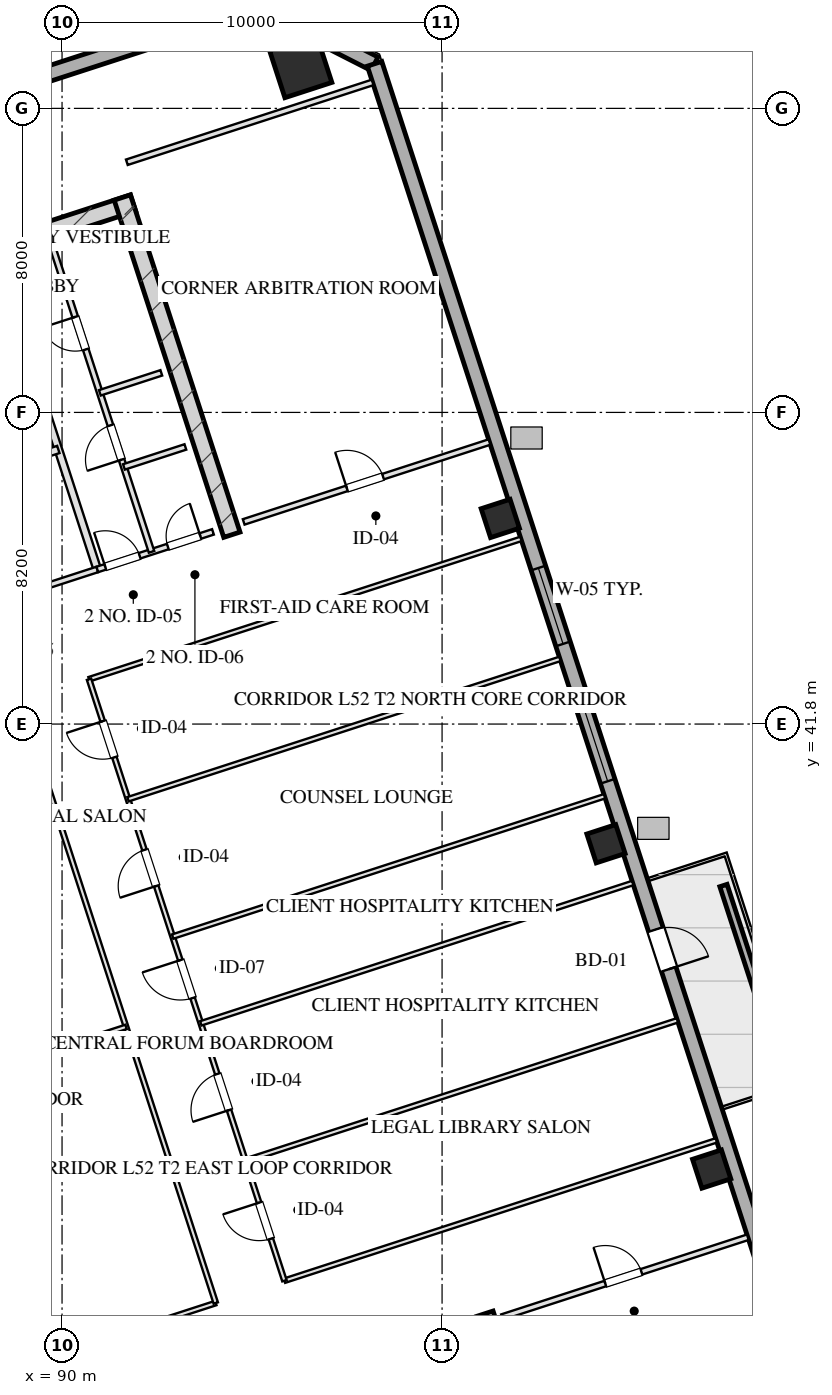
"""IFC4 building model, lengths in metres.
Left out: names, types, materials, properties, quantities, classifications, styles, units other than length and angle.
Written with IfcOpenShell. Run it as: python <this file> out.ifc"""

import sys

from ifc_helpers import new_model, si_unit, direction, frame, frame_2d, origin, origin_2d, place, context, subcontext, project, spatial, rectangle, hollow_rectangle, extrude, element, fill, save


model = new_model("IFC4")
c1 = context("Model", 3, precision=1e-05, world=origin(), true_north=direction((0.0, 1.0)))
c2 = subcontext(c1, "Body", "Model", "MODEL_VIEW")
j1 = project(units=[si_unit("LENGTHUNIT", "METRE"), si_unit("PLANEANGLEUNIT", "RADIAN")], contexts=[c1])
p1 = place(None, origin())
s1 = spatial("IfcSite", under=j1, at=p1, CompositionType="ELEMENT")
p2 = place(p1, origin())
s2 = spatial("IfcBuilding", under=s1, at=p2, CompositionType="ELEMENT")
p3 = place(p2, frame((0.0, 0.0, 195.5)))
s3 = spatial("IfcBuildingStorey", under=s2, at=p3, CompositionType="ELEMENT", Elevation=195.5)
p4 = place(p3, frame((101.128, 26.286, 0.0), z_axis=(0.0, 0.0, 1.0), x_axis=(0.309004419953, -0.951060601881, 0.0)))
e1 = element("IfcWall", 1, at=p4, inside=s3, PredefinedType="SHEAR", context=c2, shape_type="SweptSolid", body=[
    extrude(rectangle(XDim=9.33, YDim=0.45, at=frame_2d((4.665, 0.0))), origin(), (0.0, 0.0, 1.0), 3.45),
])
p5 = place(p3, frame((76.415, 50.489, 0.0), z_axis=(0.0, 0.0, 1.0), x_axis=(0.951056810414, 0.309016089169, 0.0)))
e2 = element("IfcWall", 2, at=p5, inside=s3, PredefinedType="SHEAR", context=c2, shape_type="SweptSolid", body=[
    extrude(rectangle(XDim=16.25, YDim=0.45, at=frame_2d((8.125, 0.0))), origin(), (0.0, 0.0, 1.0), 3.45),
])
p6 = place(p3, frame((94.469, 46.781, 0.0), z_axis=(0.0, 0.0, 1.0), x_axis=(-0.309004419953, 0.951060601881, 0.0)))
e3 = element("IfcWall", 3, at=p6, inside=s3, PredefinedType="SHEAR", context=c2, shape_type="SweptSolid", body=[
    extrude(rectangle(XDim=9.33, YDim=0.45, at=frame_2d((4.665, 0.0))), origin(), (0.0, 0.0, 1.0), 3.45),
])
p7 = place(p3, frame((96.281, 59.099, 0.0), z_axis=(0.0, 0.0, 1.0), x_axis=(0.951056516295, 0.309016994375, 0.0)))
e4 = element("IfcColumn", 4, at=p7, inside=s3, PredefinedType="COLUMN", context=c2, shape_type="SweptSolid", body=[
    extrude(hollow_rectangle(XDim=1.3, YDim=1.3, WallThickness=0.045, at=origin_2d()), origin(), (0.0, 0.0, 1.0), 3.451),
])
for number, where, z_axis, x_axis in (
    (5, (107.094, 30.091, 0.0), (0.0, 0.0, 1.0), (0.951, 0.309, 0.0)),
    (6, (104.313, 38.651, 0.0), (0.0, 0.0, 1.0), (0.951, 0.309, 0.0)),
    (7, (101.532, 47.21, 0.0), (0.0, 0.0, 1.0), (0.951, 0.309, 0.0)),
):
    element("IfcColumn", number, at=place(p3, frame(where, z_axis=z_axis, x_axis=x_axis)), inside=s3, PredefinedType="COLUMN", context=c2, shape_type="SweptSolid", body=[
        extrude(hollow_rectangle(XDim=0.8, YDim=0.8, WallThickness=0.028, at=origin_2d()), origin(), (0.0, 0.0, 1.0), 3.451),
    ])
p8 = place(p3, frame((70.092, 52.556, 0.0), z_axis=(0.0, 0.0, 1.0), x_axis=(0.951057580055, 0.30901372044, 0.0)))
e8 = element("IfcWall", 8, at=p8, inside=s3, PredefinedType="SOLIDWALL", context=c2, shape_type="SweptSolid", body=[
    extrude(rectangle(XDim=26.4, YDim=0.4, at=frame_2d((13.2, 0.0))), origin(), (0.0, 0.0, 1.0), 2.61),
])
p9 = place(p3, frame((95.199, 60.714, 0.0), z_axis=(0.0, 0.0, 1.0), x_axis=(0.891020832027, -0.453962417932, 0.0)))
e9 = element("IfcWall", 9, at=p9, inside=s3, PredefinedType="SOLIDWALL", context=c2, shape_type="SweptSolid", body=[
    extrude(rectangle(XDim=3.394, YDim=0.4, at=frame_2d((1.697, 0.0))), origin(), (0.0, 0.0, 1.0), 2.61),
])
p10 = place(p3, frame((98.224, 59.173, 0.0), z_axis=(0.0, 0.0, 1.0), x_axis=(0.309014228706, -0.951057414911, 0.0)))
e10 = element("IfcWall", 10, at=p10, inside=s3, PredefinedType="SOLIDWALL", context=c2, shape_type="SweptSolid", body=[
    extrude(rectangle(XDim=42.8, YDim=0.4, at=frame_2d((21.4, 0.0))), origin(), (0.0, 0.0, 1.0), 2.61),
])
p11 = place(p10, frame((17.75, 0.0, 0.75)))
e11 = element("IfcOpeningElement", 11, at=p11, cuts=e10, PredefinedType="OPENING", context=c2, shape_type="SweptSolid", body=[
    extrude(rectangle(XDim=2.1, YDim=1.46, at=frame_2d((1.05, 0.73))), frame((0.0, 0.21, 0.0), z_axis=(0.0, -1.0, 0.0), x_axis=(1.0, 0.0, 0.0)), (0.0, 0.0, 1.0), 0.42),
])
p12 = place(p10, frame((13.95, 0.0, 0.75)))
e12 = element("IfcOpeningElement", 12, at=p12, cuts=e10, PredefinedType="OPENING", context=c2, shape_type="SweptSolid", body=[
    extrude(rectangle(XDim=2.1, YDim=1.46, at=frame_2d((1.05, 0.73))), frame((0.0, 0.21, 0.0), z_axis=(0.0, -1.0, 0.0), x_axis=(1.0, 0.0, 0.0)), (0.0, 0.0, 1.0), 0.42),
])
p13 = place(p10, frame((23.95, 0.0, 0.0)))
e13 = element("IfcOpeningElement", 13, at=p13, cuts=e10, PredefinedType="OPENING", context=c2, shape_type="SweptSolid", body=[
    extrude(rectangle(XDim=1.1, YDim=2.15, at=frame_2d((0.55, 1.075))), frame((0.0, 0.21, 0.0), z_axis=(0.0, -1.0, 0.0), x_axis=(1.0, 0.0, 0.0)), (0.0, 0.0, 1.0), 0.42),
])
p14 = place(p3, frame((108.887, 32.987, 0.0), z_axis=(0.0, 0.0, 1.0), x_axis=(-0.30900096172, 0.951061725471, 0.0)))
e14 = element("IfcWall", 14, at=p14, inside=s3, PredefinedType="PARAPET", context=c2, shape_type="SweptSolid", body=[
    extrude(rectangle(XDim=4.8, YDim=0.2, at=frame_2d((2.4, 0.0))), origin(), (0.0, 0.0, 1.0), 0.75),
])
p15 = place(p3, frame((90.928, 45.868, 0.0), z_axis=(0.0, 0.0, 1.0), x_axis=(-0.309042196757, 0.951048327176, 0.0)))
e15 = element("IfcWall", 15, at=p15, inside=s3, PredefinedType="PARTITIONING", context=c2, shape_type="SweptSolid", body=[
    extrude(rectangle(XDim=8.43, YDim=0.2, at=frame_2d((4.215, 0.0))), origin(), (0.0, 0.0, 1.0), 3.175),
])
p16 = place(p3, frame((86.743, 44.508, 0.0), z_axis=(0.0, 0.0, 1.0), x_axis=(0.951063829732, 0.308994485023, 0.0)))
e16 = element("IfcWall", 16, at=p16, inside=s3, PredefinedType="PARTITIONING", context=c2, shape_type="SweptSolid", body=[
    extrude(rectangle(XDim=4.4, YDim=0.15, at=frame_2d((2.2, 0.0))), origin(), (0.0, 0.0, 1.0), 3.175),
])
p17 = place(p16, frame((1.45, 0.0, 0.0)))
e17 = element("IfcOpeningElement", 17, at=p17, cuts=e16, PredefinedType="OPENING", context=c2, shape_type="SweptSolid", body=[
    extrude(rectangle(XDim=1.5, YDim=2.05, at=frame_2d((0.75, 1.025))), frame((0.0, 0.085, 0.0), z_axis=(0.0, -1.0, 0.0), x_axis=(1.0, 0.0, 0.0)), (0.0, 0.0, 1.0), 0.17),
])
p18 = place(p3, frame((85.718, 47.666, 0.0), z_axis=(0.0, 0.0, 1.0), x_axis=(0.951058531764, 0.30901079133, 0.0)))
e18 = element("IfcWall", 18, at=p18, inside=s3, PredefinedType="PARTITIONING", context=c2, shape_type="SweptSolid", body=[
    extrude(rectangle(XDim=4.4, YDim=0.2, at=frame_2d((2.2, 0.0))), origin(), (0.0, 0.0, 1.0), 3.175),
])
p19 = place(p18, frame((0.45, 0.0, 0.0)))
e19 = element("IfcOpeningElement", 19, at=p19, cuts=e18, PredefinedType="OPENING", context=c2, shape_type="SweptSolid", body=[
    extrude(rectangle(XDim=1.1, YDim=2.05, at=frame_2d((0.55, 1.025))), frame((0.0, 0.11, 0.0), z_axis=(0.0, -1.0, 0.0), x_axis=(1.0, 0.0, 0.0)), (0.0, 0.0, 1.0), 0.22),
])
p20 = place(p18, frame((2.55, 0.0, 0.0)))
e20 = element("IfcOpeningElement", 20, at=p20, cuts=e18, PredefinedType="OPENING", context=c2, shape_type="SweptSolid", body=[
    extrude(rectangle(XDim=1.1, YDim=2.05, at=frame_2d((0.55, 1.025))), frame((0.0, 0.11, 0.0), z_axis=(0.0, -1.0, 0.0), x_axis=(1.0, 0.0, 0.0)), (0.0, 0.0, 1.0), 0.22),
])
p21 = place(p3, frame((90.928, 45.868, 0.0), z_axis=(0.0, 0.0, 1.0), x_axis=(0.951059297078, 0.309008435874, 0.0)))
e21 = element("IfcWall", 21, at=p21, inside=s3, PredefinedType="PARTITIONING", context=c2, shape_type="SweptSolid", body=[
    extrude(rectangle(XDim=3.2, YDim=0.15, at=frame_2d((1.6, 0.0))), origin(), (0.0, 0.0, 1.0), 3.175),
])
p22 = place(p21, frame((0.22, 0.0, 0.0)))
e22 = element("IfcOpeningElement", 22, at=p22, cuts=e21, PredefinedType="OPENING", context=c2, shape_type="SweptSolid", body=[
    extrude(rectangle(XDim=0.95, YDim=2.05, at=frame_2d((0.475, 1.025))), frame((0.0, 0.085, 0.0), z_axis=(0.0, -1.0, 0.0), x_axis=(1.0, 0.0, 0.0)), (0.0, 0.0, 1.0), 0.17),
])
p23 = place(p21, frame((1.95, 0.0, 0.0)))
e23 = element("IfcOpeningElement", 23, at=p23, cuts=e21, PredefinedType="OPENING", context=c2, shape_type="SweptSolid", body=[
    extrude(rectangle(XDim=0.9, YDim=2.05, at=frame_2d((0.45, 1.025))), frame((0.0, 0.085, 0.0), z_axis=(0.0, -1.0, 0.0), x_axis=(1.0, 0.0, 0.0)), (0.0, 0.0, 1.0), 0.17),
])
p24 = place(p3, frame((92.355, 46.331, 0.0), z_axis=(0.0, 0.0, 1.0), x_axis=(-0.309007490203, 0.951059604335, 0.0)))
e24 = element("IfcWall", 24, at=p24, inside=s3, PredefinedType="PARTITIONING", context=c2, shape_type="SweptSolid", body=[
    extrude(rectangle(XDim=8.43, YDim=0.15, at=frame_2d((4.215, 0.0))), origin(), (0.0, 0.0, 1.0), 3.175),
])
p25 = place(p24, frame((2.55, 0.0, 0.0)))
e25 = element("IfcOpeningElement", 25, at=p25, cuts=e24, PredefinedType="OPENING", context=c2, shape_type="SweptSolid", body=[
    extrude(rectangle(XDim=0.95, YDim=2.05, at=frame_2d((0.475, 1.025))), frame((0.0, 0.085, 0.0), z_axis=(0.0, -1.0, 0.0), x_axis=(1.0, 0.0, 0.0)), (0.0, 0.0, 1.0), 0.17),
])
p26 = place(p24, frame((5.6, 0.0, 0.0)))
e26 = element("IfcOpeningElement", 26, at=p26, cuts=e24, PredefinedType="OPENING", context=c2, shape_type="SweptSolid", body=[
    extrude(rectangle(XDim=0.9, YDim=2.05, at=frame_2d((0.45, 1.025))), frame((0.0, 0.085, 0.0), z_axis=(0.0, -1.0, 0.0), x_axis=(1.0, 0.0, 0.0)), (0.0, 0.0, 1.0), 0.17),
])
p27 = place(p3, frame((90.995, 50.516, 0.0), z_axis=(0.0, 0.0, 1.0), x_axis=(0.951040401051, 0.309066587596, 0.0)))
e27 = element("IfcWall", 27, at=p27, inside=s3, PredefinedType="PARTITIONING", context=c2, shape_type="SweptSolid", body=[
    extrude(rectangle(XDim=1.7, YDim=0.15, at=frame_2d((0.85, 0.0))), origin(), (0.0, 0.0, 1.0), 3.175),
])
p28 = place(p3, frame((91.628, 48.566, 0.0), z_axis=(0.0, 0.0, 1.0), x_axis=(0.951054116971, 0.309024378638, 0.0)))
e28 = element("IfcWall", 28, at=p28, inside=s3, PredefinedType="PARTITIONING", context=c2, shape_type="SweptSolid", body=[
    extrude(rectangle(XDim=1.7, YDim=0.15, at=frame_2d((0.85, 0.0))), origin(), (0.0, 0.0, 1.0), 3.175),
])
p29 = place(p3, frame((101.578, 26.196, 0.0), z_axis=(0.0, 0.0, 1.0), x_axis=(0.951064934653, 0.308991084134, 0.0)))
e29 = element("IfcWall", 29, at=p29, inside=s3, PredefinedType="PARTITIONING", context=c2, shape_type="SweptSolid", body=[
    extrude(rectangle(XDim=6.8, YDim=0.15, at=frame_2d((3.4, 0.0))), origin(), (0.0, 0.0, 1.0), 3.175),
])
p30 = place(p29, frame((2.856, 0.0, 0.0)))
e30 = element("IfcOpeningElement", 30, at=p30, cuts=e29, PredefinedType="OPENING", context=c2, shape_type="SweptSolid", body=[
    extrude(rectangle(XDim=1.0, YDim=2.05, at=frame_2d((0.5, 1.025))), frame((0.0, 0.085, 0.0), z_axis=(0.0, -1.0, 0.0), x_axis=(1.0, 0.0, 0.0)), (0.0, 0.0, 1.0), 0.17),
])
p31 = place(p3, frame((91.705, 56.582, 0.0), z_axis=(0.0, 0.0, 1.0), x_axis=(0.951057811516, 0.309013008068, 0.0)))
e31 = element("IfcWall", 31, at=p31, inside=s3, PredefinedType="PARTITIONING", context=c2, shape_type="SweptSolid", body=[
    extrude(rectangle(XDim=6.8, YDim=0.15, at=frame_2d((3.4, 0.0))), origin(), (0.0, 0.0, 1.0), 3.175),
])
p32 = place(p3, frame((94.78, 47.119, 0.0), z_axis=(0.0, 0.0, 1.0), x_axis=(0.951057811516, 0.309013008068, 0.0)))
e32 = element("IfcWall", 32, at=p32, inside=s3, PredefinedType="PARTITIONING", context=c2, shape_type="SweptSolid", body=[
    extrude(rectangle(XDim=6.8, YDim=0.15, at=frame_2d((3.4, 0.0))), origin(), (0.0, 0.0, 1.0), 3.175),
])
p33 = place(p32, frame((2.856, 0.0, 0.0)))
e33 = element("IfcOpeningElement", 33, at=p33, cuts=e32, PredefinedType="OPENING", context=c2, shape_type="SweptSolid", body=[
    extrude(rectangle(XDim=1.0, YDim=2.05, at=frame_2d((0.5, 1.025))), frame((0.0, 0.085, 0.0), z_axis=(0.0, -1.0, 0.0), x_axis=(1.0, 0.0, 0.0)), (0.0, 0.0, 1.0), 0.17),
])
p34 = place(p3, frame((88.814, 24.867, 0.0), z_axis=(0.0, 0.0, 1.0), x_axis=(0.951061793147, 0.309000753423, 0.0)))
e34 = element("IfcWall", 34, at=p34, inside=s3, PredefinedType="PARTITIONING", context=c2, shape_type="SweptSolid", body=[
    extrude(rectangle(XDim=5.5, YDim=0.12, at=frame_2d((2.75, 0.0))), origin(), (0.0, 0.0, 1.0), 3.175),
])
p35 = place(p3, frame((95.852, 27.153, 0.0), z_axis=(0.0, 0.0, 1.0), x_axis=(0.951054485045, 0.30902324585, 0.0)))
e35 = element("IfcWall", 35, at=p35, inside=s3, PredefinedType="PARTITIONING", context=c2, shape_type="SweptSolid", body=[
    extrude(rectangle(XDim=11.95, YDim=0.12, at=frame_2d((5.975, 0.0))), origin(), (0.0, 0.0, 1.0), 3.175),
])
p36 = place(p3, frame((90.71, 42.979, 0.0), z_axis=(0.0, 0.0, 1.0), x_axis=(0.95105853842, 0.309010770845, 0.0)))
e36 = element("IfcWall", 36, at=p36, inside=s3, PredefinedType="PARTITIONING", context=c2, shape_type="SweptSolid", body=[
    extrude(rectangle(XDim=11.95, YDim=0.12, at=frame_2d((5.975, 0.0))), origin(), (0.0, 0.0, 1.0), 3.175),
])
p37 = place(p3, frame((94.045, 26.566, 0.0), z_axis=(0.0, 0.0, 1.0), x_axis=(-0.30901773025, 0.951056277195, 0.0)))
e37 = element("IfcWall", 37, at=p37, inside=s3, PredefinedType="PARTITIONING", context=c2, shape_type="SweptSolid", body=[
    extrude(rectangle(XDim=16.64, YDim=0.12, at=frame_2d((8.32, 0.0))), origin(), (0.0, 0.0, 1.0), 3.175),
])
p38 = place(p3, frame((95.852, 27.153, 0.0), z_axis=(0.0, 0.0, 1.0), x_axis=(-0.309004459387, 0.951060589068, 0.0)))
e38 = element("IfcWall", 38, at=p38, inside=s3, PredefinedType="PARTITIONING", context=c2, shape_type="SweptSolid", body=[
    extrude(rectangle(XDim=16.64, YDim=0.12, at=frame_2d((8.32, 0.0))), origin(), (0.0, 0.0, 1.0), 3.175),
])
p39 = place(p38, frame((1.16, 0.0, 0.0)))
e39 = element("IfcOpeningElement", 39, at=p39, cuts=e38, PredefinedType="OPENING", context=c2, shape_type="SweptSolid", body=[
    extrude(rectangle(XDim=1.0, YDim=2.05, at=frame_2d((0.5, 1.025))), frame((0.0, 0.07, 0.0), z_axis=(0.0, -1.0, 0.0), x_axis=(1.0, 0.0, 0.0)), (0.0, 0.0, 1.0), 0.14),
])
p40 = place(p38, frame((4.72, 0.0, 0.0)))
e40 = element("IfcOpeningElement", 40, at=p40, cuts=e38, PredefinedType="OPENING", context=c2, shape_type="SweptSolid", body=[
    extrude(rectangle(XDim=1.0, YDim=2.05, at=frame_2d((0.5, 1.025))), frame((0.0, 0.07, 0.0), z_axis=(0.0, -1.0, 0.0), x_axis=(1.0, 0.0, 0.0)), (0.0, 0.0, 1.0), 0.14),
])
p41 = place(p38, frame((7.82, 0.0, 0.0)))
e41 = element("IfcOpeningElement", 41, at=p41, cuts=e38, PredefinedType="OPENING", context=c2, shape_type="SweptSolid", body=[
    extrude(rectangle(XDim=1.05, YDim=2.05, at=frame_2d((0.525, 1.025))), frame((0.0, 0.07, 0.0), z_axis=(0.0, -1.0, 0.0), x_axis=(1.0, 0.0, 0.0)), (0.0, 0.0, 1.0), 0.14),
])
p42 = place(p38, frame((10.92, 0.0, 0.0)))
e42 = element("IfcOpeningElement", 42, at=p42, cuts=e38, PredefinedType="OPENING", context=c2, shape_type="SweptSolid", body=[
    extrude(rectangle(XDim=1.0, YDim=2.05, at=frame_2d((0.5, 1.025))), frame((0.0, 0.07, 0.0), z_axis=(0.0, -1.0, 0.0), x_axis=(1.0, 0.0, 0.0)), (0.0, 0.0, 1.0), 0.14),
])
p43 = place(p38, frame((14.48, 0.0, 0.0)))
e43 = element("IfcOpeningElement", 43, at=p43, cuts=e38, PredefinedType="OPENING", context=c2, shape_type="SweptSolid", body=[
    extrude(rectangle(XDim=1.0, YDim=2.05, at=frame_2d((0.5, 1.025))), frame((0.0, 0.07, 0.0), z_axis=(0.0, -1.0, 0.0), x_axis=(1.0, 0.0, 0.0)), (0.0, 0.0, 1.0), 0.14),
])
p44 = place(p3, frame((86.453, 32.133, 0.0), z_axis=(0.0, 0.0, 1.0), x_axis=(0.951052986339, 0.309027858251, 0.0)))
e44 = element("IfcWall", 44, at=p44, inside=s3, PredefinedType="PARTITIONING", context=c2, shape_type="SweptSolid", body=[
    extrude(rectangle(XDim=5.5, YDim=0.12, at=frame_2d((2.75, 0.0))), origin(), (0.0, 0.0, 1.0), 3.175),
])
for number, where, z_axis, x_axis in (
    (45, (94.826, 30.311, 0.0), (0.0, 0.0, 1.0), (0.951, 0.309, 0.0)),
    (46, (93.652, 33.925, 0.0), (0.0, 0.0, 1.0), (0.951, 0.309, 0.0)),
):
    element("IfcWall", number, at=place(p3, frame(where, z_axis=z_axis, x_axis=x_axis)), inside=s3, PredefinedType="PARTITIONING", context=c2, shape_type="SweptSolid", body=[
        extrude(rectangle(XDim=11.95, YDim=0.12, at=frame_2d((5.975, 0.0))), origin(), (0.0, 0.0, 1.0), 3.175),
    ])
for number, where, z_axis, x_axis in (
    (47, (92.91, 36.207, 0.0), (0.0, 0.0, 1.0), (0.951, 0.309, 0.0)),
    (48, (91.736, 39.821, 0.0), (0.0, 0.0, 1.0), (0.951, 0.309, 0.0)),
):
    element("IfcWall", number, at=place(p3, frame(where, z_axis=z_axis, x_axis=x_axis)), inside=s3, PredefinedType="PARTITIONING", context=c2, shape_type="SweptSolid", body=[
        extrude(rectangle(XDim=11.95, YDim=0.12, at=frame_2d((5.975, 0.0))), origin(), (0.0, 0.0, 1.0), 3.175),
    ])
p45 = place(p11, origin())
e49 = element("IfcWindow", 49, at=p45, inside=s3, PartitioningType="TRIPLE_PANEL_VERTICAL", PredefinedType="WINDOW", context=c2, shape_type="SweptSolid", body=[
    extrude(rectangle(XDim=2.1, YDim=1.46, at=frame_2d((1.05, 0.73))), frame((0.0, 0.03, 0.0), z_axis=(0.0, -1.0, 0.0), x_axis=(1.0, 0.0, 0.0)), (0.0, 0.0, 1.0), 0.06),
])
fill(e11, e49)
p46 = place(p12, origin())
e50 = element("IfcWindow", 50, at=p46, inside=s3, PartitioningType="TRIPLE_PANEL_VERTICAL", PredefinedType="WINDOW", context=c2, shape_type="SweptSolid", body=[
    extrude(rectangle(XDim=2.1, YDim=1.46, at=frame_2d((1.05, 0.73))), frame((0.0, 0.03, 0.0), z_axis=(0.0, -1.0, 0.0), x_axis=(1.0, 0.0, 0.0)), (0.0, 0.0, 1.0), 0.06),
])
fill(e12, e50)
p47 = place(p13, origin())
e51 = element("IfcDoor", 51, at=p47, inside=s3, OperationType="SINGLE_SWING_RIGHT", PredefinedType="DOOR", context=c2, shape_type="SweptSolid", body=[
    extrude(rectangle(XDim=1.1, YDim=2.15, at=frame_2d((0.55, 1.075))), frame((0.0, 0.025, 0.0), z_axis=(0.0, -1.0, 0.0), x_axis=(1.0, 0.0, 0.0)), (0.0, 0.0, 1.0), 0.05),
])
fill(e13, e51)
p48 = place(p22, origin())
e52 = element("IfcDoor", 52, at=p48, inside=s3, OperationType="SINGLE_SWING_LEFT", PredefinedType="DOOR", context=c2, shape_type="SweptSolid", body=[
    extrude(rectangle(XDim=0.95, YDim=2.05, at=frame_2d((0.475, 1.025))), frame((0.0, 0.025, 0.0), z_axis=(0.0, -1.0, 0.0), x_axis=(1.0, 0.0, 0.0)), (0.0, 0.0, 1.0), 0.05),
])
fill(e22, e52)
p49 = place(p23, origin())
e53 = element("IfcDoor", 53, at=p49, inside=s3, OperationType="SINGLE_SWING_RIGHT", PredefinedType="DOOR", context=c2, shape_type="SweptSolid", body=[
    extrude(rectangle(XDim=0.9, YDim=2.05, at=frame_2d((0.45, 1.025))), frame((0.0, 0.025, 0.0), z_axis=(0.0, -1.0, 0.0), x_axis=(1.0, 0.0, 0.0)), (0.0, 0.0, 1.0), 0.05),
])
fill(e23, e53)
p50 = place(p25, origin())
e54 = element("IfcDoor", 54, at=p50, inside=s3, OperationType="SINGLE_SWING_LEFT", PredefinedType="DOOR", context=c2, shape_type="SweptSolid", body=[
    extrude(rectangle(XDim=0.95, YDim=2.05, at=frame_2d((0.475, 1.025))), frame((0.0, 0.025, 0.0), z_axis=(0.0, -1.0, 0.0), x_axis=(1.0, 0.0, 0.0)), (0.0, 0.0, 1.0), 0.05),
])
fill(e25, e54)
p51 = place(p26, origin())
e55 = element("IfcDoor", 55, at=p51, inside=s3, OperationType="SINGLE_SWING_RIGHT", PredefinedType="DOOR", context=c2, shape_type="SweptSolid", body=[
    extrude(rectangle(XDim=0.9, YDim=2.05, at=frame_2d((0.45, 1.025))), frame((0.0, 0.025, 0.0), z_axis=(0.0, -1.0, 0.0), x_axis=(1.0, 0.0, 0.0)), (0.0, 0.0, 1.0), 0.05),
])
fill(e26, e55)
p52 = place(p30, origin())
e56 = element("IfcDoor", 56, at=p52, inside=s3, OperationType="SINGLE_SWING_LEFT", PredefinedType="DOOR", context=c2, shape_type="SweptSolid", body=[
    extrude(rectangle(XDim=1.0, YDim=2.05, at=frame_2d((0.5, 1.025))), frame((0.0, 0.025, 0.0), z_axis=(0.0, -1.0, 0.0), x_axis=(1.0, 0.0, 0.0)), (0.0, 0.0, 1.0), 0.05),
])
fill(e30, e56)
p53 = place(p33, origin())
e57 = element("IfcDoor", 57, at=p53, inside=s3, OperationType="SINGLE_SWING_LEFT", PredefinedType="DOOR", context=c2, shape_type="SweptSolid", body=[
    extrude(rectangle(XDim=1.0, YDim=2.05, at=frame_2d((0.5, 1.025))), frame((0.0, 0.025, 0.0), z_axis=(0.0, -1.0, 0.0), x_axis=(1.0, 0.0, 0.0)), (0.0, 0.0, 1.0), 0.05),
])
fill(e33, e57)
p54 = place(p39, origin())
e58 = element("IfcDoor", 58, at=p54, inside=s3, OperationType="SINGLE_SWING_RIGHT", PredefinedType="DOOR", context=c2, shape_type="SweptSolid", body=[
    extrude(rectangle(XDim=1.0, YDim=2.05, at=frame_2d((0.5, 1.025))), frame((0.0, 0.025, 0.0), z_axis=(0.0, -1.0, 0.0), x_axis=(1.0, 0.0, 0.0)), (0.0, 0.0, 1.0), 0.05),
])
fill(e39, e58)
p55 = place(p40, origin())
e59 = element("IfcDoor", 59, at=p55, inside=s3, OperationType="SINGLE_SWING_LEFT", PredefinedType="DOOR", context=c2, shape_type="SweptSolid", body=[
    extrude(rectangle(XDim=1.0, YDim=2.05, at=frame_2d((0.5, 1.025))), frame((0.0, 0.025, 0.0), z_axis=(0.0, -1.0, 0.0), x_axis=(1.0, 0.0, 0.0)), (0.0, 0.0, 1.0), 0.05),
])
fill(e40, e59)
p56 = place(p41, origin())
e60 = element("IfcDoor", 60, at=p56, inside=s3, OperationType="SINGLE_SWING_RIGHT", PredefinedType="DOOR", context=c2, shape_type="SweptSolid", body=[
    extrude(rectangle(XDim=1.05, YDim=2.05, at=frame_2d((0.525, 1.025))), frame((0.0, 0.025, 0.0), z_axis=(0.0, -1.0, 0.0), x_axis=(1.0, 0.0, 0.0)), (0.0, 0.0, 1.0), 0.05),
])
fill(e41, e60)
p57 = place(p42, origin())
e61 = element("IfcDoor", 61, at=p57, inside=s3, OperationType="SINGLE_SWING_LEFT", PredefinedType="DOOR", context=c2, shape_type="SweptSolid", body=[
    extrude(rectangle(XDim=1.0, YDim=2.05, at=frame_2d((0.5, 1.025))), frame((0.0, 0.025, 0.0), z_axis=(0.0, -1.0, 0.0), x_axis=(1.0, 0.0, 0.0)), (0.0, 0.0, 1.0), 0.05),
])
fill(e42, e61)
p58 = place(p43, origin())
e62 = element("IfcDoor", 62, at=p58, inside=s3, OperationType="SINGLE_SWING_RIGHT", PredefinedType="DOOR", context=c2, shape_type="SweptSolid", body=[
    extrude(rectangle(XDim=1.0, YDim=2.05, at=frame_2d((0.5, 1.025))), frame((0.0, 0.025, 0.0), z_axis=(0.0, -1.0, 0.0), x_axis=(1.0, 0.0, 0.0)), (0.0, 0.0, 1.0), 0.05),
])
fill(e43, e62)
save(model, sys.argv[1])
